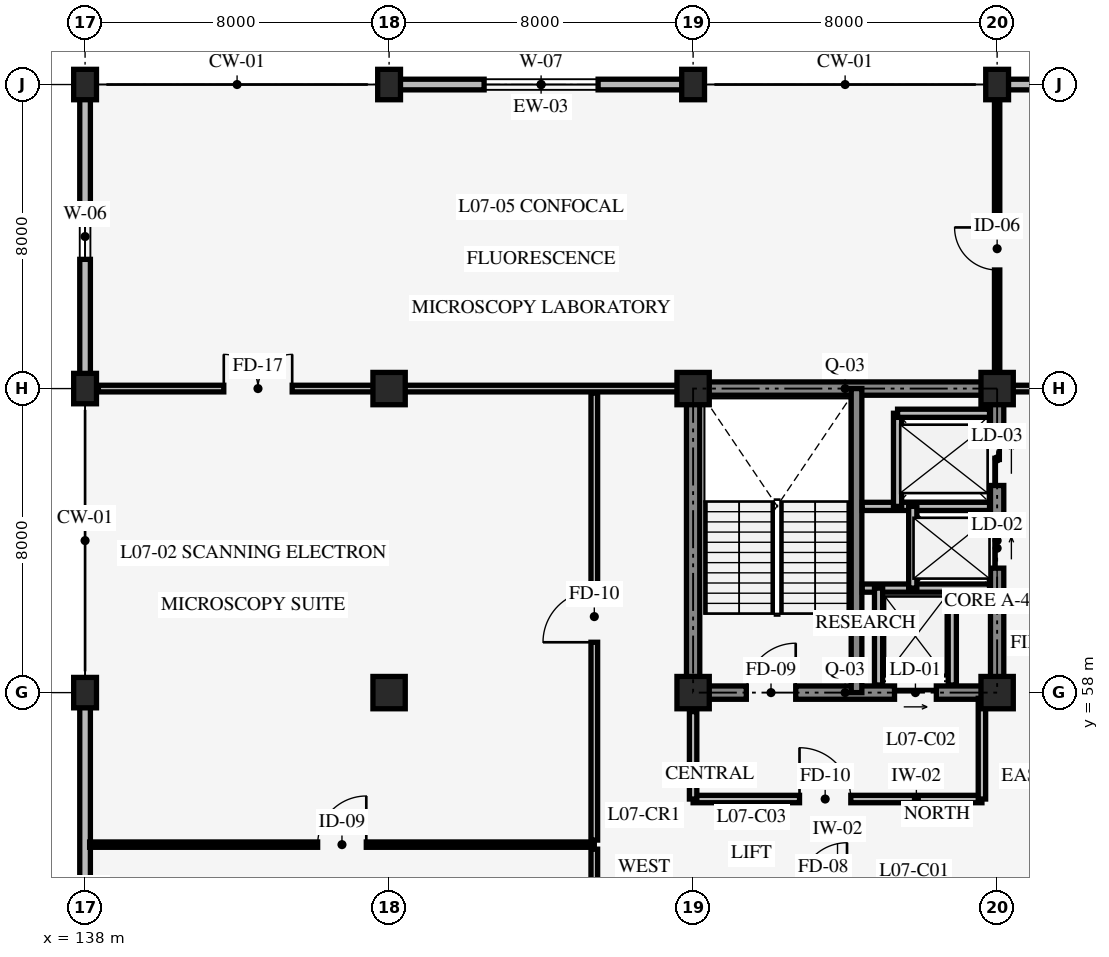
"""IFC4 building model, lengths in metres.
Left out: names, types, materials, properties, quantities, classifications, styles, units other than length and angle.
Written with IfcOpenShell. Run it as: python <this file> out.ifc"""

import sys

from ifc_helpers import new_model, si_unit, direction, frame, frame_2d, origin, origin_2d, place, context, subcontext, project, spatial, rectangle, extrude, element, fill, save


model = new_model("IFC4")
c1 = context("Model", 3, precision=1e-05, world=origin(), true_north=direction((0.0, 1.0)))
c2 = subcontext(c1, "Body", "Model", "MODEL_VIEW")
j1 = project(units=[si_unit("LENGTHUNIT", "METRE"), si_unit("PLANEANGLEUNIT", "RADIAN")], contexts=[c1])
p1 = place(None, origin())
s1 = spatial("IfcSite", under=j1, at=p1, CompositionType="ELEMENT")
p2 = place(p1, origin())
s2 = spatial("IfcBuilding", under=s1, at=p2, CompositionType="ELEMENT")
p3 = place(p2, frame((0.0, 0.0, 27.6)))
s3 = spatial("IfcBuildingStorey", under=s2, at=p3, CompositionType="ELEMENT", Elevation=27.6)
p4 = place(p3, frame((154.0, 58.0, 0.0), z_axis=(0.0, 0.0, 1.0), x_axis=(1.0, 0.0, 0.0)))
e1 = element("IfcWall", 1, at=p4, inside=s3, PredefinedType="SHEAR", context=c2, shape_type="SweptSolid", body=[
    extrude(rectangle(XDim=8.0, YDim=0.35, at=frame_2d((4.0, 0.0))), origin(), (0.0, 0.0, 1.0), 3.95),
])
p5 = place(p4, frame((1.4, 0.0, 0.0)))
e2 = element("IfcOpeningElement", 2, at=p5, cuts=e1, PredefinedType="OPENING", context=c2, shape_type="SweptSolid", body=[
    extrude(rectangle(XDim=1.3, YDim=2.15, at=frame_2d((0.65, 1.075))), frame((0.0, 0.185, 0.0), z_axis=(0.0, -1.0, 0.0), x_axis=(1.0, 0.0, 0.0)), (0.0, 0.0, 1.0), 0.37),
])
p6 = place(p4, frame((5.3, 0.0, 0.0)))
e3 = element("IfcOpeningElement", 3, at=p6, cuts=e1, PredefinedType="OPENING", context=c2, shape_type="SweptSolid", body=[
    extrude(rectangle(XDim=1.1, YDim=2.2, at=frame_2d((0.55, 1.1))), frame((0.0, 0.185, 0.0), z_axis=(0.0, -1.0, 0.0), x_axis=(1.0, 0.0, 0.0)), (0.0, 0.0, 1.0), 0.37),
])
p7 = place(p3, frame((162.0, 58.0, 0.0), z_axis=(0.0, 0.0, 1.0), x_axis=(0.0, 1.0, 0.0)))
e4 = element("IfcWall", 4, at=p7, inside=s3, PredefinedType="SHEAR", context=c2, shape_type="SweptSolid", body=[
    extrude(rectangle(XDim=8.0, YDim=0.35, at=frame_2d((4.0, 0.0))), origin(), (0.0, 0.0, 1.0), 3.95),
])
p8 = place(p7, frame((3.275, 0.0, 0.0)))
e5 = element("IfcOpeningElement", 5, at=p8, cuts=e4, PredefinedType="OPENING", context=c2, shape_type="SweptSolid", body=[
    extrude(rectangle(XDim=1.05, YDim=2.2, at=frame_2d((0.525, 1.1))), frame((0.0, 0.185, 0.0), z_axis=(0.0, -1.0, 0.0), x_axis=(1.0, 0.0, 0.0)), (0.0, 0.0, 1.0), 0.37),
])
p9 = place(p7, frame((5.45, 0.0, 0.0)))
e6 = element("IfcOpeningElement", 6, at=p9, cuts=e4, PredefinedType="OPENING", context=c2, shape_type="SweptSolid", body=[
    extrude(rectangle(XDim=1.4, YDim=2.3, at=frame_2d((0.7, 1.15))), frame((0.0, 0.185, 0.0), z_axis=(0.0, -1.0, 0.0), x_axis=(1.0, 0.0, 0.0)), (0.0, 0.0, 1.0), 0.37),
])
for number, where, z_axis, x_axis in (
    (7, (162.0, 66.0, 0.0), (0.0, 0.0, 1.0), (-1.0, 0.0, 0.0)),
    (8, (154.0, 66.0, 0.0), (0.0, 0.0, 1.0), (0.0, -1.0, 0.0)),
):
    element("IfcWall", number, at=place(p3, frame(where, z_axis=z_axis, x_axis=x_axis)), inside=s3, PredefinedType="SHEAR", context=c2, shape_type="SweptSolid", body=[
        extrude(rectangle(XDim=8.0, YDim=0.35, at=frame_2d((4.0, 0.0))), origin(), (0.0, 0.0, 1.0), 3.95),
    ])
p10 = place(p3, frame((158.3, 58.0, 0.0), z_axis=(0.0, 0.0, 1.0), x_axis=(0.0, 1.0, 0.0)))
e9 = element("IfcWall", 9, at=p10, inside=s3, PredefinedType="SHEAR", context=c2, shape_type="SweptSolid", body=[
    extrude(rectangle(XDim=8.0, YDim=0.28, at=frame_2d((4.0, 0.0))), origin(), (0.0, 0.0, 1.0), 3.95),
])
for number, where, z_axis, x_axis in (
    (10, (138.0, 58.0, 0.0), (0.0, 0.0, 1.0), (1.0, 0.0, 0.0)),
    (11, (138.0, 66.0, 0.0), (0.0, 0.0, 1.0), (1.0, 0.0, 0.0)),
    (12, (138.0, 74.0, 0.0), (0.0, 0.0, 1.0), (1.0, 0.0, 0.0)),
):
    element("IfcColumn", number, at=place(p3, frame(where, z_axis=z_axis, x_axis=x_axis)), inside=s3, PredefinedType="COLUMN", context=c2, shape_type="SweptSolid", body=[
        extrude(rectangle(XDim=0.6, YDim=0.8, at=origin_2d()), origin(), (0.0, 0.0, 1.0), 4.2),
    ])
for number, where, z_axis, x_axis in (
    (13, (146.0, 58.0, 0.0), (0.0, 0.0, 1.0), (1.0, 0.0, 0.0)),
    (14, (146.0, 66.0, 0.0), (0.0, 0.0, 1.0), (1.0, 0.0, 0.0)),
):
    element("IfcColumn", number, at=place(p3, frame(where, z_axis=z_axis, x_axis=x_axis)), inside=s3, PredefinedType="COLUMN", context=c2, shape_type="SweptSolid", body=[
        extrude(rectangle(XDim=0.85, YDim=0.85, at=origin_2d()), origin(), (0.0, 0.0, 1.0), 4.2),
    ])
p11 = place(p3, frame((146.0, 74.0, 0.0), z_axis=(0.0, 0.0, 1.0), x_axis=(1.0, 0.0, 0.0)))
e15 = element("IfcColumn", 15, at=p11, inside=s3, PredefinedType="COLUMN", context=c2, shape_type="SweptSolid", body=[
    extrude(rectangle(XDim=0.6, YDim=0.8, at=origin_2d()), origin(), (0.0, 0.0, 1.0), 4.2),
])
for number, where, z_axis, x_axis in (
    (16, (154.0, 58.0, 0.0), (0.0, 0.0, 1.0), (1.0, 0.0, 0.0)),
    (17, (154.0, 66.0, 0.0), (0.0, 0.0, 1.0), (1.0, 0.0, 0.0)),
):
    element("IfcColumn", number, at=place(p3, frame(where, z_axis=z_axis, x_axis=x_axis)), inside=s3, PredefinedType="COLUMN", context=c2, shape_type="SweptSolid", body=[
        extrude(rectangle(XDim=0.85, YDim=0.85, at=origin_2d()), origin(), (0.0, 0.0, 1.0), 4.2),
    ])
p12 = place(p3, frame((154.0, 74.0, 0.0), z_axis=(0.0, 0.0, 1.0), x_axis=(1.0, 0.0, 0.0)))
e18 = element("IfcColumn", 18, at=p12, inside=s3, PredefinedType="COLUMN", context=c2, shape_type="SweptSolid", body=[
    extrude(rectangle(XDim=0.6, YDim=0.8, at=origin_2d()), origin(), (0.0, 0.0, 1.0), 4.2),
])
for number, where, z_axis, x_axis in (
    (19, (162.0, 58.0, 0.0), (0.0, 0.0, 1.0), (1.0, 0.0, 0.0)),
    (20, (162.0, 66.0, 0.0), (0.0, 0.0, 1.0), (1.0, 0.0, 0.0)),
):
    element("IfcColumn", number, at=place(p3, frame(where, z_axis=z_axis, x_axis=x_axis)), inside=s3, PredefinedType="COLUMN", context=c2, shape_type="SweptSolid", body=[
        extrude(rectangle(XDim=0.85, YDim=0.85, at=origin_2d()), origin(), (0.0, 0.0, 1.0), 4.2),
    ])
p13 = place(p3, frame((162.0, 74.0, 0.0), z_axis=(0.0, 0.0, 1.0), x_axis=(1.0, 0.0, 0.0)))
e21 = element("IfcColumn", 21, at=p13, inside=s3, PredefinedType="COLUMN", context=c2, shape_type="SweptSolid", body=[
    extrude(rectangle(XDim=0.6, YDim=0.8, at=origin_2d()), origin(), (0.0, 0.0, 1.0), 4.2),
])
p14 = place(p3, frame((138.0, 50.0, 0.0), z_axis=(0.0, 0.0, 1.0), x_axis=(0.0, 1.0, 0.0)))
e22 = element("IfcWall", 22, at=p14, inside=s3, PredefinedType="STANDARD", context=c2, shape_type="SweptSolid", body=[
    extrude(rectangle(XDim=8.0, YDim=0.28, at=frame_2d((4.0, 0.0))), origin(), (0.0, 0.0, 1.0), 3.29),
])
p15 = place(p14, frame((1.517, 0.0, 0.85)))
e23 = element("IfcOpeningElement", 23, at=p15, cuts=e22, PredefinedType="OPENING", context=c2, shape_type="SweptSolid", body=[
    extrude(rectangle(XDim=1.5, YDim=1.5, at=frame_2d((0.75, 0.75))), frame((0.0, 0.15, 0.0), z_axis=(0.0, -1.0, 0.0), x_axis=(1.0, 0.0, 0.0)), (0.0, 0.0, 1.0), 0.3),
])
p16 = place(p3, frame((138.0, 66.0, 0.0), z_axis=(0.0, 0.0, 1.0), x_axis=(0.0, 1.0, 0.0)))
e24 = element("IfcWall", 24, at=p16, inside=s3, PredefinedType="STANDARD", context=c2, shape_type="SweptSolid", body=[
    extrude(rectangle(XDim=8.0, YDim=0.28, at=frame_2d((4.0, 0.0))), origin(), (0.0, 0.0, 1.0), 3.29),
])
p17 = place(p16, frame((3.4, 0.0, 0.85)))
e25 = element("IfcOpeningElement", 25, at=p17, cuts=e24, PredefinedType="OPENING", context=c2, shape_type="SweptSolid", body=[
    extrude(rectangle(XDim=1.2, YDim=1.2, at=frame_2d((0.6, 0.6))), frame((0.0, 0.15, 0.0), z_axis=(0.0, -1.0, 0.0), x_axis=(1.0, 0.0, 0.0)), (0.0, 0.0, 1.0), 0.3),
])
p18 = place(p3, frame((146.0, 74.0, 0.0), z_axis=(0.0, 0.0, 1.0), x_axis=(1.0, 0.0, 0.0)))
e26 = element("IfcWall", 26, at=p18, inside=s3, PredefinedType="STANDARD", context=c2, shape_type="SweptSolid", body=[
    extrude(rectangle(XDim=8.0, YDim=0.28, at=frame_2d((4.0, 0.0))), origin(), (0.0, 0.0, 1.0), 3.24),
])
p19 = place(p18, frame((2.5, 0.0, 0.85)))
e27 = element("IfcOpeningElement", 27, at=p19, cuts=e26, PredefinedType="OPENING", context=c2, shape_type="SweptSolid", body=[
    extrude(rectangle(XDim=3.0, YDim=1.8, at=frame_2d((1.5, 0.9))), frame((0.0, 0.15, 0.0), z_axis=(0.0, -1.0, 0.0), x_axis=(1.0, 0.0, 0.0)), (0.0, 0.0, 1.0), 0.3),
])
p20 = place(p3, frame((162.0, 74.0, 0.0), z_axis=(0.0, 0.0, 1.0), x_axis=(1.0, 0.0, 0.0)))
e28 = element("IfcWall", 28, at=p20, inside=s3, PredefinedType="STANDARD", context=c2, shape_type="SweptSolid", body=[
    extrude(rectangle(XDim=8.0, YDim=0.28, at=frame_2d((4.0, 0.0))), origin(), (0.0, 0.0, 1.0), 3.24),
])
p21 = place(p20, frame((2.6, 0.0, 0.85)))
e29 = element("IfcOpeningElement", 29, at=p21, cuts=e28, PredefinedType="OPENING", context=c2, shape_type="SweptSolid", body=[
    extrude(rectangle(XDim=2.8, YDim=1.6, at=frame_2d((1.4, 0.8))), frame((0.0, 0.15, 0.0), z_axis=(0.0, -1.0, 0.0), x_axis=(1.0, 0.0, 0.0)), (0.0, 0.0, 1.0), 0.3),
])
p22 = place(p3, frame((158.45, 62.9, 0.0), z_axis=(0.0, 0.0, 1.0), x_axis=(1.0, 0.0, 0.0)))
e30 = element("IfcWall", 30, at=p22, inside=s3, PredefinedType="STANDARD", context=c2, shape_type="SweptSolid", body=[
    extrude(rectangle(XDim=3.35, YDim=0.215, at=frame_2d((1.675, 0.0))), origin(), (0.0, 0.0, 1.0), 3.9),
])
p23 = place(p3, frame((160.82, 58.2, 0.0), z_axis=(0.0, 0.0, 1.0), x_axis=(0.0, 1.0, 0.0)))
e31 = element("IfcWall", 31, at=p23, inside=s3, PredefinedType="STANDARD", context=c2, shape_type="SweptSolid", body=[
    extrude(rectangle(XDim=2.55, YDim=0.215, at=frame_2d((1.275, 0.0))), origin(), (0.0, 0.0, 1.0), 3.9),
])
p24 = place(p3, frame((159.38, 62.9, 0.0), z_axis=(0.0, 0.0, 1.0), x_axis=(0.0, 1.0, 0.0)))
e32 = element("IfcWall", 32, at=p24, inside=s3, PredefinedType="STANDARD", context=c2, shape_type="SweptSolid", body=[
    extrude(rectangle(XDim=2.45, YDim=0.215, at=frame_2d((1.225, 0.0))), origin(), (0.0, 0.0, 1.0), 3.9),
])
p25 = place(p3, frame((159.38, 65.35, 0.0), z_axis=(0.0, 0.0, 1.0), x_axis=(1.0, 0.0, 0.0)))
e33 = element("IfcWall", 33, at=p25, inside=s3, PredefinedType="STANDARD", context=c2, shape_type="SweptSolid", body=[
    extrude(rectangle(XDim=2.42, YDim=0.215, at=frame_2d((1.21, 0.0))), origin(), (0.0, 0.0, 1.0), 3.9),
])
p26 = place(p3, frame((158.45, 60.75, 0.0), z_axis=(0.0, 0.0, 1.0), x_axis=(1.0, 0.0, 0.0)))
e34 = element("IfcWall", 34, at=p26, inside=s3, PredefinedType="STANDARD", context=c2, shape_type="SweptSolid", body=[
    extrude(rectangle(XDim=3.35, YDim=0.215, at=frame_2d((1.675, 0.0))), origin(), (0.0, 0.0, 1.0), 3.9),
])
p27 = place(p3, frame((159.78, 60.75, 0.0), z_axis=(0.0, 0.0, 1.0), x_axis=(0.0, 1.0, 0.0)))
e35 = element("IfcWall", 35, at=p27, inside=s3, PredefinedType="STANDARD", context=c2, shape_type="SweptSolid", body=[
    extrude(rectangle(XDim=2.15, YDim=0.215, at=frame_2d((1.075, 0.0))), origin(), (0.0, 0.0, 1.0), 3.9),
])
p28 = place(p3, frame((158.88, 58.2, 0.0), z_axis=(0.0, 0.0, 1.0), x_axis=(0.0, 1.0, 0.0)))
e36 = element("IfcWall", 36, at=p28, inside=s3, PredefinedType="STANDARD", context=c2, shape_type="SweptSolid", body=[
    extrude(rectangle(XDim=2.55, YDim=0.215, at=frame_2d((1.275, 0.0))), origin(), (0.0, 0.0, 1.0), 3.9),
])
p29 = place(p3, frame((154.0, 55.2, 0.0), z_axis=(0.0, 0.0, 1.0), x_axis=(1.0, 0.0, 0.0)))
e37 = element("IfcWall", 37, at=p29, inside=s3, PredefinedType="STANDARD", context=c2, shape_type="SweptSolid", body=[
    extrude(rectangle(XDim=7.6, YDim=0.195, at=frame_2d((3.8, 0.0))), origin(), (0.0, 0.0, 1.0), 3.9),
])
p30 = place(p29, frame((2.8, 0.0, 0.0)))
e38 = element("IfcOpeningElement", 38, at=p30, cuts=e37, PredefinedType="OPENING", context=c2, shape_type="SweptSolid", body=[
    extrude(rectangle(XDim=1.35, YDim=2.15, at=frame_2d((0.675, 1.075))), frame((0.0, 0.107, 0.0), z_axis=(0.0, -1.0, 0.0), x_axis=(1.0, 0.0, 0.0)), (0.0, 0.0, 1.0), 0.215),
])
p31 = place(p3, frame((161.6, 55.2, 0.0), z_axis=(0.0, 0.0, 1.0), x_axis=(0.0, 1.0, 0.0)))
e39 = element("IfcWall", 39, at=p31, inside=s3, PredefinedType="STANDARD", context=c2, shape_type="SweptSolid", body=[
    extrude(rectangle(XDim=2.65, YDim=0.195, at=frame_2d((1.325, 0.0))), origin(), (0.0, 0.0, 1.0), 3.29),
])
p32 = place(p3, frame((154.0, 55.2, 0.0), z_axis=(0.0, 0.0, 1.0), x_axis=(0.0, 1.0, 0.0)))
e40 = element("IfcWall", 40, at=p32, inside=s3, PredefinedType="STANDARD", context=c2, shape_type="SweptSolid", body=[
    extrude(rectangle(XDim=2.3, YDim=0.195, at=frame_2d((1.15, 0.0))), origin(), (0.0, 0.0, 1.0), 3.29),
])
p33 = place(p3, frame((151.4, 42.12, 0.0), z_axis=(0.0, 0.0, 1.0), x_axis=(0.0, 1.0, 0.0)))
e41 = element("IfcWall", 41, at=p33, inside=s3, PredefinedType="STANDARD", context=c2, shape_type="SweptSolid", body=[
    extrude(rectangle(XDim=11.76, YDim=0.175, at=frame_2d((5.88, 0.0))), origin(), (0.0, 0.0, 1.0), 3.9),
])
p34 = place(p33, frame((5.23, 0.0, 0.0)))
e42 = element("IfcOpeningElement", 42, at=p34, cuts=e41, PredefinedType="OPENING", context=c2, shape_type="SweptSolid", body=[
    extrude(rectangle(XDim=1.3, YDim=2.15, at=frame_2d((0.65, 1.075))), frame((0.0, 0.098, 0.0), z_axis=(0.0, -1.0, 0.0), x_axis=(1.0, 0.0, 0.0)), (0.0, 0.0, 1.0), 0.195),
])
p35 = place(p3, frame((138.12, 54.0, 0.0), z_axis=(0.0, 0.0, 1.0), x_axis=(1.0, 0.0, 0.0)))
e43 = element("IfcWall", 43, at=p35, inside=s3, PredefinedType="STANDARD", context=c2, shape_type="SweptSolid", body=[
    extrude(rectangle(XDim=13.28, YDim=0.14, at=frame_2d((6.64, 0.0))), origin(), (0.0, 0.0, 1.0), 3.9),
])
p36 = place(p35, frame((6.0, 0.0, 0.0)))
e44 = element("IfcOpeningElement", 44, at=p36, cuts=e43, PredefinedType="OPENING", context=c2, shape_type="SweptSolid", body=[
    extrude(rectangle(XDim=1.28, YDim=2.14, at=frame_2d((0.64, 1.07))), frame((0.0, 0.08, 0.0), z_axis=(0.0, -1.0, 0.0), x_axis=(1.0, 0.0, 0.0)), (0.0, 0.0, 1.0), 0.16),
])
p37 = place(p3, frame((151.4, 54.12, 0.0), z_axis=(0.0, 0.0, 1.0), x_axis=(0.0, 1.0, 0.0)))
e45 = element("IfcWall", 45, at=p37, inside=s3, PredefinedType="STANDARD", context=c2, shape_type="SweptSolid", body=[
    extrude(rectangle(XDim=11.76, YDim=0.175, at=frame_2d((5.88, 0.0))), origin(), (0.0, 0.0, 1.0), 3.9),
])
p38 = place(p37, frame((5.205, 0.0, 0.0)))
e46 = element("IfcOpeningElement", 46, at=p38, cuts=e45, PredefinedType="OPENING", context=c2, shape_type="SweptSolid", body=[
    extrude(rectangle(XDim=1.35, YDim=2.15, at=frame_2d((0.675, 1.075))), frame((0.0, 0.098, 0.0), z_axis=(0.0, -1.0, 0.0), x_axis=(1.0, 0.0, 0.0)), (0.0, 0.0, 1.0), 0.195),
])
p39 = place(p3, frame((138.35, 66.0, 0.0), z_axis=(0.0, 0.0, 1.0), x_axis=(1.0, 0.0, 0.0)))
e47 = element("IfcWall", 47, at=p39, inside=s3, PredefinedType="STANDARD", context=c2, shape_type="SweptSolid", body=[
    extrude(rectangle(XDim=15.3, YDim=0.175, at=frame_2d((7.65, 0.0))), origin(), (0.0, 0.0, 1.0), 3.24),
])
p40 = place(p39, frame((3.3, 0.0, 0.0)))
e48 = element("IfcOpeningElement", 48, at=p40, cuts=e47, PredefinedType="OPENING", context=c2, shape_type="SweptSolid", body=[
    extrude(rectangle(XDim=1.8, YDim=2.3, at=frame_2d((0.9, 1.15))), frame((0.0, 0.098, 0.0), z_axis=(0.0, -1.0, 0.0), x_axis=(1.0, 0.0, 0.0)), (0.0, 0.0, 1.0), 0.195),
])
p41 = place(p3, frame((162.0, 66.12, 0.0), z_axis=(0.0, 0.0, 1.0), x_axis=(0.0, 1.0, 0.0)))
e49 = element("IfcWall", 49, at=p41, inside=s3, PredefinedType="STANDARD", context=c2, shape_type="SweptSolid", body=[
    extrude(rectangle(XDim=7.83, YDim=0.14, at=frame_2d((3.915, 0.0))), origin(), (0.0, 0.0, 1.0), 3.29),
])
p42 = place(p41, frame((3.0, 0.0, 0.0)))
e50 = element("IfcOpeningElement", 50, at=p42, cuts=e49, PredefinedType="OPENING", context=c2, shape_type="SweptSolid", body=[
    extrude(rectangle(XDim=1.12, YDim=2.12, at=frame_2d((0.56, 1.06))), frame((0.0, 0.08, 0.0), z_axis=(0.0, -1.0, 0.0), x_axis=(1.0, 0.0, 0.0)), (0.0, 0.0, 1.0), 0.16),
])
p43 = place(p3, frame((162.35, 66.0, 0.0), z_axis=(0.0, 0.0, 1.0), x_axis=(1.0, 0.0, 0.0)))
e51 = element("IfcWall", 51, at=p43, inside=s3, PredefinedType="STANDARD", context=c2, shape_type="SweptSolid", body=[
    extrude(rectangle(XDim=14.7, YDim=0.175, at=frame_2d((7.35, 0.0))), origin(), (0.0, 0.0, 1.0), 3.24),
])
p44 = place(p43, frame((1.05, 0.0, 0.0)))
e52 = element("IfcOpeningElement", 52, at=p44, cuts=e51, PredefinedType="OPENING", context=c2, shape_type="SweptSolid", body=[
    extrude(rectangle(XDim=0.9, YDim=2.1, at=frame_2d((0.45, 1.05))), frame((0.0, 0.098, 0.0), z_axis=(0.0, -1.0, 0.0), x_axis=(1.0, 0.0, 0.0)), (0.0, 0.0, 1.0), 0.195),
])
p45 = place(p17, origin())
e53 = element("IfcWindow", 53, at=p45, inside=s3, PartitioningType="SINGLE_PANEL", PredefinedType="WINDOW", context=c2, shape_type="SweptSolid", body=[
    extrude(rectangle(XDim=1.2, YDim=1.2, at=frame_2d((0.6, 0.6))), frame((0.0, 0.03, 0.0), z_axis=(0.0, -1.0, 0.0), x_axis=(1.0, 0.0, 0.0)), (0.0, 0.0, 1.0), 0.06),
])
fill(e25, e53)
p46 = place(p19, origin())
e54 = element("IfcWindow", 54, at=p46, inside=s3, PartitioningType="SINGLE_PANEL", PredefinedType="WINDOW", context=c2, shape_type="SweptSolid", body=[
    extrude(rectangle(XDim=3.0, YDim=1.8, at=frame_2d((1.5, 0.9))), frame((0.0, 0.03, 0.0), z_axis=(0.0, -1.0, 0.0), x_axis=(1.0, 0.0, 0.0)), (0.0, 0.0, 1.0), 0.06),
])
fill(e27, e54)
p47 = place(p5, origin())
e55 = element("IfcDoor", 55, at=p47, inside=s3, OperationType="SINGLE_SWING_RIGHT", PredefinedType="DOOR", context=c2, shape_type="SweptSolid", body=[
    extrude(rectangle(XDim=1.3, YDim=2.15, at=frame_2d((0.65, 1.075))), frame((0.0, 0.025, 0.0), z_axis=(0.0, -1.0, 0.0), x_axis=(1.0, 0.0, 0.0)), (0.0, 0.0, 1.0), 0.05),
])
fill(e2, e55)
p48 = place(p6, origin())
e56 = element("IfcDoor", 56, at=p48, inside=s3, OperationType="SLIDING_TO_RIGHT", PredefinedType="DOOR", context=c2, shape_type="SweptSolid", body=[
    extrude(rectangle(XDim=1.1, YDim=2.2, at=frame_2d((0.55, 1.1))), frame((0.0, 0.025, 0.0), z_axis=(0.0, -1.0, 0.0), x_axis=(1.0, 0.0, 0.0)), (0.0, 0.0, 1.0), 0.05),
])
fill(e3, e56)
p49 = place(p8, origin())
e57 = element("IfcDoor", 57, at=p49, inside=s3, OperationType="SLIDING_TO_RIGHT", PredefinedType="DOOR", context=c2, shape_type="SweptSolid", body=[
    extrude(rectangle(XDim=1.05, YDim=2.2, at=frame_2d((0.525, 1.1))), frame((0.0, 0.025, 0.0), z_axis=(0.0, -1.0, 0.0), x_axis=(1.0, 0.0, 0.0)), (0.0, 0.0, 1.0), 0.05),
])
fill(e5, e57)
p50 = place(p9, origin())
e58 = element("IfcDoor", 58, at=p50, inside=s3, OperationType="DOUBLE_DOOR_SLIDING", PredefinedType="DOOR", context=c2, shape_type="SweptSolid", body=[
    extrude(rectangle(XDim=1.4, YDim=2.3, at=frame_2d((0.7, 1.15))), frame((0.0, 0.025, 0.0), z_axis=(0.0, -1.0, 0.0), x_axis=(1.0, 0.0, 0.0)), (0.0, 0.0, 1.0), 0.05),
])
fill(e6, e58)
p51 = place(p30, origin())
e59 = element("IfcDoor", 59, at=p51, inside=s3, OperationType="SINGLE_SWING_LEFT", PredefinedType="DOOR", context=c2, shape_type="SweptSolid", body=[
    extrude(rectangle(XDim=1.35, YDim=2.15, at=frame_2d((0.675, 1.075))), frame((0.0, 0.025, 0.0), z_axis=(0.0, -1.0, 0.0), x_axis=(1.0, 0.0, 0.0)), (0.0, 0.0, 1.0), 0.05),
])
fill(e38, e59)
p52 = place(p36, origin())
e60 = element("IfcDoor", 60, at=p52, inside=s3, OperationType="SINGLE_SWING_RIGHT", PredefinedType="DOOR", context=c2, shape_type="SweptSolid", body=[
    extrude(rectangle(XDim=1.28, YDim=2.14, at=frame_2d((0.64, 1.07))), frame((0.0, 0.025, 0.0), z_axis=(0.0, -1.0, 0.0), x_axis=(1.0, 0.0, 0.0)), (0.0, 0.0, 1.0), 0.05),
])
fill(e44, e60)
p53 = place(p38, origin())
e61 = element("IfcDoor", 61, at=p53, inside=s3, OperationType="SINGLE_SWING_LEFT", PredefinedType="DOOR", context=c2, shape_type="SweptSolid", body=[
    extrude(rectangle(XDim=1.35, YDim=2.15, at=frame_2d((0.675, 1.075))), frame((0.0, 0.025, 0.0), z_axis=(0.0, -1.0, 0.0), x_axis=(1.0, 0.0, 0.0)), (0.0, 0.0, 1.0), 0.05),
])
fill(e46, e61)
p54 = place(p40, origin())
e62 = element("IfcDoor", 62, at=p54, inside=s3, OperationType="DOUBLE_DOOR_SINGLE_SWING", PredefinedType="DOOR", context=c2, shape_type="SweptSolid", body=[
    extrude(rectangle(XDim=1.8, YDim=2.3, at=frame_2d((0.9, 1.15))), frame((0.0, 0.025, 0.0), z_axis=(0.0, -1.0, 0.0), x_axis=(1.0, 0.0, 0.0)), (0.0, 0.0, 1.0), 0.05),
])
fill(e48, e62)
p55 = place(p42, origin())
e63 = element("IfcDoor", 63, at=p55, inside=s3, OperationType="SINGLE_SWING_RIGHT", PredefinedType="DOOR", context=c2, shape_type="SweptSolid", body=[
    extrude(rectangle(XDim=1.12, YDim=2.12, at=frame_2d((0.56, 1.06))), frame((0.0, 0.025, 0.0), z_axis=(0.0, -1.0, 0.0), x_axis=(1.0, 0.0, 0.0)), (0.0, 0.0, 1.0), 0.05),
])
fill(e50, e63)
save(model, sys.argv[1])
